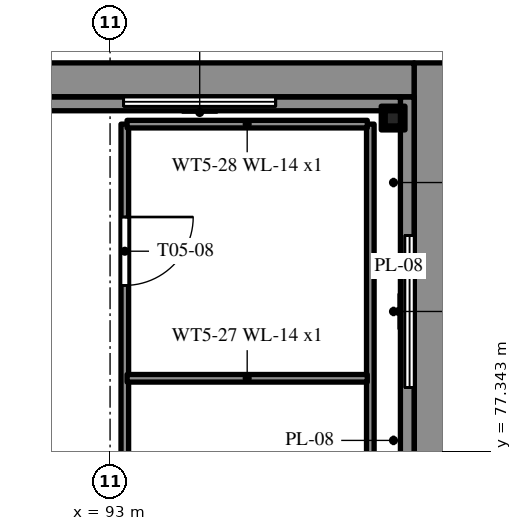
"""IFC4 building model, lengths in metres.
Left out: names, types, materials, properties, quantities, classifications, styles, units other than length and angle.
Written with IfcOpenShell. Run it as: python <this file> out.ifc"""

import sys

from ifc_helpers import new_model, si_unit, direction, frame, frame_2d, origin, origin_2d, place, context, subcontext, project, spatial, polyline, rectangle, hollow_rectangle, i_section, outline, extrude, element, fill, save


model = new_model("IFC4")
c1 = context("Model", 3, precision=1e-05, world=origin(), true_north=direction((0.0, 1.0)))
c2 = subcontext(c1, "Body", "Model", "MODEL_VIEW")
j1 = project(units=[si_unit("LENGTHUNIT", "METRE"), si_unit("PLANEANGLEUNIT", "RADIAN")], contexts=[c1])
p1 = place(None, origin())
s1 = spatial("IfcSite", under=j1, at=p1, CompositionType="ELEMENT")
p2 = place(p1, origin())
s2 = spatial("IfcBuilding", under=s1, at=p2, CompositionType="ELEMENT")
p3 = place(p2, frame((0.0, 0.0, 24.0)))
s3 = spatial("IfcBuildingStorey", under=s2, at=p3, CompositionType="ELEMENT", Elevation=24.0)
p4 = place(p3, frame((97.225, 55.4, 0.0), z_axis=(0.0, 0.0, 1.0), x_axis=(0.0, 1.0, 0.0)))
e1 = element("IfcWall", 1, at=p4, inside=s3, PredefinedType="SOLIDWALL", context=c2, shape_type="SweptSolid", body=[
    extrude(outline(polyline([(0.0, 0.0), (27.05, 0.0), (27.05, 0.5), (25.75, 0.5), (25.664, 0.5), (25.578, 0.5), (22.978, 0.5), (22.899, 0.5), (20.704, 0.5), (20.509, 0.5), (18.742, 0.5), (18.677, 0.5), (17.018, 0.5), (16.956, 0.5), (16.894, 0.5), (13.935, 0.5), (13.871, 0.5), (13.807, 0.5), (11.958, 0.5), (11.896, 0.5), (10.181, 0.5), (10.025, 0.5), (8.455, 0.5), (8.397, 0.5), (6.845, 0.5), (6.789, 0.5), (6.732, 0.5), (3.004, 0.5), (2.947, 0.5), (2.89, 0.5), (1.288, 0.5), (1.232, 0.5), (0.0, 0.5), (0.0, 0.0)])), frame((0.0, 0.225, 0.0), z_axis=(0.0, -1.0, 0.0), x_axis=(1.0, 0.0, 0.0)), (0.0, 0.0, 1.0), 0.45),
])
p5 = place(p3, frame((71.0, 82.225, 0.0), z_axis=(0.0, 0.0, 1.0), x_axis=(1.0, 0.0, 0.0)))
e2 = element("IfcWall", 2, at=p5, inside=s3, PredefinedType="SOLIDWALL", context=c2, shape_type="SweptSolid", body=[
    extrude(outline(polyline([(0.0, 0.0), (26.0, 0.0), (26.0, 0.5), (23.148, 0.5), (22.794, 0.5), (22.44, 0.5), (19.953, 0.5), (19.716, 0.5), (19.631, 0.5), (19.478, 0.5), (19.394, 0.5), (19.157, 0.5), (6.843, 0.5), (6.606, 0.5), (6.522, 0.5), (6.369, 0.5), (6.284, 0.5), (6.047, 0.5), (3.56, 0.5), (3.206, 0.5), (2.852, 0.5), (0.0, 0.5), (0.0, 0.0)])), frame((0.0, 0.225, 0.0), z_axis=(0.0, -1.0, 0.0), x_axis=(1.0, 0.0, 0.0)), (0.0, 0.0, 1.0), 0.45),
])
p6 = place(p3, frame((96.724, 81.724, 0.0), z_axis=(0.0, 0.0, 1.0), x_axis=(1.0, 0.0, 0.0)))
e3 = element("IfcColumn", 3, at=p6, inside=s3, PredefinedType="COLUMN", context=c2, shape_type="SweptSolid", body=[
    extrude(i_section(OverallWidth=0.312, OverallDepth=0.312, WebThickness=0.017, FlangeThickness=0.017, FilletRadius=0.016, at=origin_2d()), origin(), (0.0, 0.0, 1.0), 12.21),
])
p7 = place(p3, frame((96.424, 70.0, 0.0), z_axis=(0.0, 0.0, 1.0), x_axis=(0.0, 1.0, 0.0)))
e4 = element("IfcWall", 4, at=p7, inside=s3, PredefinedType="PARTITIONING", context=c2, shape_type="SweptSolid", body=[
    extrude(rectangle(XDim=11.644, YDim=0.1, at=frame_2d((5.822, 0.0))), origin(), (0.0, 0.0, 1.0), 3.2),
])
p8 = place(p3, frame((93.194, 70.0, 0.0), z_axis=(0.0, 0.0, 1.0), x_axis=(0.0, 1.0, 0.0)))
e5 = element("IfcWall", 5, at=p8, inside=s3, PredefinedType="PARTITIONING", context=c2, shape_type="SweptSolid", body=[
    extrude(rectangle(XDim=11.644, YDim=0.1, at=frame_2d((5.822, 0.0))), origin(), (0.0, 0.0, 1.0), 3.2),
])
p9 = place(p8, frame((1.75, 0.0, 0.0)))
e6 = element("IfcOpeningElement", 6, at=p9, cuts=e5, PredefinedType="OPENING", context=c2, shape_type="SweptSolid", body=[
    extrude(rectangle(XDim=0.9, YDim=2.1, at=frame_2d((0.45, 1.05))), frame((0.0, 0.06, 0.0), z_axis=(0.0, -1.0, 0.0), x_axis=(1.0, 0.0, 0.0)), (0.0, 0.0, 1.0), 0.12),
])
p10 = place(p8, frame((5.9, 0.0, 0.0)))
e7 = element("IfcOpeningElement", 7, at=p10, cuts=e5, PredefinedType="OPENING", context=c2, shape_type="SweptSolid", body=[
    extrude(rectangle(XDim=0.9, YDim=2.1, at=frame_2d((0.45, 1.05))), frame((0.0, 0.06, 0.0), z_axis=(0.0, -1.0, 0.0), x_axis=(1.0, 0.0, 0.0)), (0.0, 0.0, 1.0), 0.12),
])
p11 = place(p8, frame((9.522, 0.0, 0.0)))
e8 = element("IfcOpeningElement", 8, at=p11, cuts=e5, PredefinedType="OPENING", context=c2, shape_type="SweptSolid", body=[
    extrude(rectangle(XDim=0.9, YDim=2.1, at=frame_2d((0.45, 1.05))), frame((0.0, 0.06, 0.0), z_axis=(0.0, -1.0, 0.0), x_axis=(1.0, 0.0, 0.0)), (0.0, 0.0, 1.0), 0.12),
])
for number, where, z_axis, x_axis in (
    (9, (96.384, 78.3, 0.0), (0.0, 0.0, 1.0), (-1.0, 0.0, 0.0)),
    (10, (96.384, 81.644, 0.0), (0.0, 0.0, 1.0), (-1.0, 0.0, 0.0)),
):
    element("IfcWall", number, at=place(p3, frame(where, z_axis=z_axis, x_axis=x_axis)), inside=s3, PredefinedType="PARTITIONING", context=c2, shape_type="SweptSolid", body=[
        extrude(rectangle(XDim=3.16, YDim=0.1, at=frame_2d((1.58, 0.0))), origin(), (0.0, 0.0, 1.0), 3.2),
    ])
p12 = place(p3, frame((96.94, 56.12, 0.0), z_axis=(0.0, 0.0, 1.0), x_axis=(0.0, 1.0, 0.0)))
e11 = element("IfcWall", 11, at=p12, inside=s3, PredefinedType="STANDARD", context=c2, shape_type="SweptSolid", body=[
    extrude(rectangle(XDim=25.76, YDim=0.12, at=frame_2d((12.88, 0.0))), origin(), (0.0, 0.0, 1.0), 4.0),
])
p13 = place(p12, frame((1.701, 0.0, 1.4)))
e12 = element("IfcOpeningElement", 12, at=p13, cuts=e11, PredefinedType="OPENING", context=c2, shape_type="SweptSolid", body=[
    extrude(rectangle(XDim=2.0, YDim=1.2, at=frame_2d((1.0, 0.6))), frame((0.0, 0.07, 0.0), z_axis=(0.0, -1.0, 0.0), x_axis=(1.0, 0.0, 0.0)), (0.0, 0.0, 1.0), 0.14),
])
p14 = place(p12, frame((11.88, 0.0, 1.4)))
e13 = element("IfcOpeningElement", 13, at=p14, cuts=e11, PredefinedType="OPENING", context=c2, shape_type="SweptSolid", body=[
    extrude(rectangle(XDim=2.0, YDim=1.2, at=frame_2d((1.0, 0.6))), frame((0.0, 0.07, 0.0), z_axis=(0.0, -1.0, 0.0), x_axis=(1.0, 0.0, 0.0)), (0.0, 0.0, 1.0), 0.14),
])
p15 = place(p12, frame((22.059, 0.0, 1.4)))
e14 = element("IfcOpeningElement", 14, at=p15, cuts=e11, PredefinedType="OPENING", context=c2, shape_type="SweptSolid", body=[
    extrude(rectangle(XDim=2.0, YDim=1.2, at=frame_2d((1.0, 0.6))), frame((0.0, 0.07, 0.0), z_axis=(0.0, -1.0, 0.0), x_axis=(1.0, 0.0, 0.0)), (0.0, 0.0, 1.0), 0.14),
])
p16 = place(p12, frame((7.49, 0.0, 0.5)))
e15 = element("IfcOpeningElement", 15, at=p16, cuts=e11, PredefinedType="OPENING", context=c2, shape_type="SweptSolid", body=[
    extrude(rectangle(XDim=0.6, YDim=2.1, at=frame_2d((0.3, 1.05))), frame((0.0, 0.07, 0.0), z_axis=(0.0, -1.0, 0.0), x_axis=(1.0, 0.0, 0.0)), (0.0, 0.0, 1.0), 0.14),
])
p17 = place(p12, frame((17.67, 0.0, 0.5)))
e16 = element("IfcOpeningElement", 16, at=p17, cuts=e11, PredefinedType="OPENING", context=c2, shape_type="SweptSolid", body=[
    extrude(rectangle(XDim=0.6, YDim=2.1, at=frame_2d((0.3, 1.05))), frame((0.0, 0.07, 0.0), z_axis=(0.0, -1.0, 0.0), x_axis=(1.0, 0.0, 0.0)), (0.0, 0.0, 1.0), 0.14),
])
p18 = place(p3, frame((96.94, 56.12, 4.0), z_axis=(0.0, 0.0, 1.0), x_axis=(0.0, 1.0, 0.0)))
e17 = element("IfcWall", 17, at=p18, inside=s3, PredefinedType="STANDARD", context=c2, shape_type="SweptSolid", body=[
    extrude(rectangle(XDim=25.76, YDim=0.12, at=frame_2d((12.88, 0.0))), origin(), (0.0, 0.0, 1.0), 8.5),
])
p19 = place(p18, frame((1.701, 0.0, 2.4)))
e18 = element("IfcOpeningElement", 18, at=p19, cuts=e17, PredefinedType="OPENING", context=c2, shape_type="SweptSolid", body=[
    extrude(rectangle(XDim=2.0, YDim=1.2, at=frame_2d((1.0, 0.6))), frame((0.0, 0.07, 0.0), z_axis=(0.0, -1.0, 0.0), x_axis=(1.0, 0.0, 0.0)), (0.0, 0.0, 1.0), 0.14),
])
p20 = place(p18, frame((1.701, 0.0, 5.6)))
e19 = element("IfcOpeningElement", 19, at=p20, cuts=e17, PredefinedType="OPENING", context=c2, shape_type="SweptSolid", body=[
    extrude(rectangle(XDim=2.0, YDim=1.2, at=frame_2d((1.0, 0.6))), frame((0.0, 0.07, 0.0), z_axis=(0.0, -1.0, 0.0), x_axis=(1.0, 0.0, 0.0)), (0.0, 0.0, 1.0), 0.14),
])
p21 = place(p18, frame((11.88, 0.0, 2.4)))
e20 = element("IfcOpeningElement", 20, at=p21, cuts=e17, PredefinedType="OPENING", context=c2, shape_type="SweptSolid", body=[
    extrude(rectangle(XDim=2.0, YDim=1.2, at=frame_2d((1.0, 0.6))), frame((0.0, 0.07, 0.0), z_axis=(0.0, -1.0, 0.0), x_axis=(1.0, 0.0, 0.0)), (0.0, 0.0, 1.0), 0.14),
])
p22 = place(p18, frame((11.88, 0.0, 5.6)))
e21 = element("IfcOpeningElement", 21, at=p22, cuts=e17, PredefinedType="OPENING", context=c2, shape_type="SweptSolid", body=[
    extrude(rectangle(XDim=2.0, YDim=1.2, at=frame_2d((1.0, 0.6))), frame((0.0, 0.07, 0.0), z_axis=(0.0, -1.0, 0.0), x_axis=(1.0, 0.0, 0.0)), (0.0, 0.0, 1.0), 0.14),
])
p23 = place(p18, frame((22.059, 0.0, 2.4)))
e22 = element("IfcOpeningElement", 22, at=p23, cuts=e17, PredefinedType="OPENING", context=c2, shape_type="SweptSolid", body=[
    extrude(rectangle(XDim=2.0, YDim=1.2, at=frame_2d((1.0, 0.6))), frame((0.0, 0.07, 0.0), z_axis=(0.0, -1.0, 0.0), x_axis=(1.0, 0.0, 0.0)), (0.0, 0.0, 1.0), 0.14),
])
p24 = place(p18, frame((22.059, 0.0, 5.6)))
e23 = element("IfcOpeningElement", 23, at=p24, cuts=e17, PredefinedType="OPENING", context=c2, shape_type="SweptSolid", body=[
    extrude(rectangle(XDim=2.0, YDim=1.2, at=frame_2d((1.0, 0.6))), frame((0.0, 0.07, 0.0), z_axis=(0.0, -1.0, 0.0), x_axis=(1.0, 0.0, 0.0)), (0.0, 0.0, 1.0), 0.14),
])
p25 = place(p18, frame((7.49, 0.0, 1.5)))
e24 = element("IfcOpeningElement", 24, at=p25, cuts=e17, PredefinedType="OPENING", context=c2, shape_type="SweptSolid", body=[
    extrude(rectangle(XDim=0.6, YDim=2.1, at=frame_2d((0.3, 1.05))), frame((0.0, 0.07, 0.0), z_axis=(0.0, -1.0, 0.0), x_axis=(1.0, 0.0, 0.0)), (0.0, 0.0, 1.0), 0.14),
])
p26 = place(p18, frame((17.67, 0.0, 1.5)))
e25 = element("IfcOpeningElement", 25, at=p26, cuts=e17, PredefinedType="OPENING", context=c2, shape_type="SweptSolid", body=[
    extrude(rectangle(XDim=0.6, YDim=2.1, at=frame_2d((0.3, 1.05))), frame((0.0, 0.07, 0.0), z_axis=(0.0, -1.0, 0.0), x_axis=(1.0, 0.0, 0.0)), (0.0, 0.0, 1.0), 0.14),
])
p27 = place(p3, frame((71.0, 81.94, 0.0), z_axis=(0.0, 0.0, 1.0), x_axis=(1.0, 0.0, 0.0)))
e26 = element("IfcWall", 26, at=p27, inside=s3, PredefinedType="STANDARD", context=c2, shape_type="SweptSolid", body=[
    extrude(rectangle(XDim=26.0, YDim=0.12, at=frame_2d((13.0, 0.0))), origin(), (0.0, 0.0, 1.0), 4.0),
])
p28 = place(p27, frame((1.821, 0.0, 1.4)))
e27 = element("IfcOpeningElement", 27, at=p28, cuts=e26, PredefinedType="OPENING", context=c2, shape_type="SweptSolid", body=[
    extrude(rectangle(XDim=2.0, YDim=1.2, at=frame_2d((1.0, 0.6))), frame((0.0, 0.07, 0.0), z_axis=(0.0, -1.0, 0.0), x_axis=(1.0, 0.0, 0.0)), (0.0, 0.0, 1.0), 0.14),
])
p29 = place(p27, frame((12.0, 0.0, 1.4)))
e28 = element("IfcOpeningElement", 28, at=p29, cuts=e26, PredefinedType="OPENING", context=c2, shape_type="SweptSolid", body=[
    extrude(rectangle(XDim=2.0, YDim=1.2, at=frame_2d((1.0, 0.6))), frame((0.0, 0.07, 0.0), z_axis=(0.0, -1.0, 0.0), x_axis=(1.0, 0.0, 0.0)), (0.0, 0.0, 1.0), 0.14),
])
p30 = place(p27, frame((22.179, 0.0, 1.4)))
e29 = element("IfcOpeningElement", 29, at=p30, cuts=e26, PredefinedType="OPENING", context=c2, shape_type="SweptSolid", body=[
    extrude(rectangle(XDim=2.0, YDim=1.2, at=frame_2d((1.0, 0.6))), frame((0.0, 0.07, 0.0), z_axis=(0.0, -1.0, 0.0), x_axis=(1.0, 0.0, 0.0)), (0.0, 0.0, 1.0), 0.14),
])
p31 = place(p27, frame((7.61, 0.0, 0.5)))
e30 = element("IfcOpeningElement", 30, at=p31, cuts=e26, PredefinedType="OPENING", context=c2, shape_type="SweptSolid", body=[
    extrude(rectangle(XDim=0.6, YDim=2.1, at=frame_2d((0.3, 1.05))), frame((0.0, 0.07, 0.0), z_axis=(0.0, -1.0, 0.0), x_axis=(1.0, 0.0, 0.0)), (0.0, 0.0, 1.0), 0.14),
])
p32 = place(p27, frame((17.79, 0.0, 0.5)))
e31 = element("IfcOpeningElement", 31, at=p32, cuts=e26, PredefinedType="OPENING", context=c2, shape_type="SweptSolid", body=[
    extrude(rectangle(XDim=0.6, YDim=2.1, at=frame_2d((0.3, 1.05))), frame((0.0, 0.07, 0.0), z_axis=(0.0, -1.0, 0.0), x_axis=(1.0, 0.0, 0.0)), (0.0, 0.0, 1.0), 0.14),
])
p33 = place(p3, frame((71.0, 81.94, 4.0), z_axis=(0.0, 0.0, 1.0), x_axis=(1.0, 0.0, 0.0)))
e32 = element("IfcWall", 32, at=p33, inside=s3, PredefinedType="STANDARD", context=c2, shape_type="SweptSolid", body=[
    extrude(rectangle(XDim=26.0, YDim=0.12, at=frame_2d((13.0, 0.0))), origin(), (0.0, 0.0, 1.0), 8.5),
])
p34 = place(p33, frame((1.821, 0.0, 2.4)))
e33 = element("IfcOpeningElement", 33, at=p34, cuts=e32, PredefinedType="OPENING", context=c2, shape_type="SweptSolid", body=[
    extrude(rectangle(XDim=2.0, YDim=1.2, at=frame_2d((1.0, 0.6))), frame((0.0, 0.07, 0.0), z_axis=(0.0, -1.0, 0.0), x_axis=(1.0, 0.0, 0.0)), (0.0, 0.0, 1.0), 0.14),
])
p35 = place(p33, frame((1.821, 0.0, 5.6)))
e34 = element("IfcOpeningElement", 34, at=p35, cuts=e32, PredefinedType="OPENING", context=c2, shape_type="SweptSolid", body=[
    extrude(rectangle(XDim=2.0, YDim=1.2, at=frame_2d((1.0, 0.6))), frame((0.0, 0.07, 0.0), z_axis=(0.0, -1.0, 0.0), x_axis=(1.0, 0.0, 0.0)), (0.0, 0.0, 1.0), 0.14),
])
p36 = place(p33, frame((12.0, 0.0, 2.4)))
e35 = element("IfcOpeningElement", 35, at=p36, cuts=e32, PredefinedType="OPENING", context=c2, shape_type="SweptSolid", body=[
    extrude(rectangle(XDim=2.0, YDim=1.2, at=frame_2d((1.0, 0.6))), frame((0.0, 0.07, 0.0), z_axis=(0.0, -1.0, 0.0), x_axis=(1.0, 0.0, 0.0)), (0.0, 0.0, 1.0), 0.14),
])
p37 = place(p33, frame((12.0, 0.0, 5.6)))
e36 = element("IfcOpeningElement", 36, at=p37, cuts=e32, PredefinedType="OPENING", context=c2, shape_type="SweptSolid", body=[
    extrude(rectangle(XDim=2.0, YDim=1.2, at=frame_2d((1.0, 0.6))), frame((0.0, 0.07, 0.0), z_axis=(0.0, -1.0, 0.0), x_axis=(1.0, 0.0, 0.0)), (0.0, 0.0, 1.0), 0.14),
])
p38 = place(p33, frame((22.179, 0.0, 2.4)))
e37 = element("IfcOpeningElement", 37, at=p38, cuts=e32, PredefinedType="OPENING", context=c2, shape_type="SweptSolid", body=[
    extrude(rectangle(XDim=2.0, YDim=1.2, at=frame_2d((1.0, 0.6))), frame((0.0, 0.07, 0.0), z_axis=(0.0, -1.0, 0.0), x_axis=(1.0, 0.0, 0.0)), (0.0, 0.0, 1.0), 0.14),
])
p39 = place(p33, frame((22.179, 0.0, 5.6)))
e38 = element("IfcOpeningElement", 38, at=p39, cuts=e32, PredefinedType="OPENING", context=c2, shape_type="SweptSolid", body=[
    extrude(rectangle(XDim=2.0, YDim=1.2, at=frame_2d((1.0, 0.6))), frame((0.0, 0.07, 0.0), z_axis=(0.0, -1.0, 0.0), x_axis=(1.0, 0.0, 0.0)), (0.0, 0.0, 1.0), 0.14),
])
p40 = place(p33, frame((7.61, 0.0, 1.5)))
e39 = element("IfcOpeningElement", 39, at=p40, cuts=e32, PredefinedType="OPENING", context=c2, shape_type="SweptSolid", body=[
    extrude(rectangle(XDim=0.6, YDim=2.1, at=frame_2d((0.3, 1.05))), frame((0.0, 0.07, 0.0), z_axis=(0.0, -1.0, 0.0), x_axis=(1.0, 0.0, 0.0)), (0.0, 0.0, 1.0), 0.14),
])
p41 = place(p33, frame((17.79, 0.0, 1.5)))
e40 = element("IfcOpeningElement", 40, at=p41, cuts=e32, PredefinedType="OPENING", context=c2, shape_type="SweptSolid", body=[
    extrude(rectangle(XDim=0.6, YDim=2.1, at=frame_2d((0.3, 1.05))), frame((0.0, 0.07, 0.0), z_axis=(0.0, -1.0, 0.0), x_axis=(1.0, 0.0, 0.0)), (0.0, 0.0, 1.0), 0.14),
])
p42 = place(p3, frame((96.91, 56.0, 12.5), z_axis=(0.0, 0.0, 1.0), x_axis=(0.0, 1.0, 0.0)))
e41 = element("IfcWall", 41, at=p42, inside=s3, PredefinedType="PARAPET", context=c2, shape_type="SweptSolid", body=[
    extrude(rectangle(XDim=26.0, YDim=0.18, at=frame_2d((13.0, 0.0))), origin(), (0.0, 0.0, 1.0), 1.1),
])
p43 = place(p3, frame((71.18, 81.91, 12.5), z_axis=(0.0, 0.0, 1.0), x_axis=(1.0, 0.0, 0.0)))
e42 = element("IfcWall", 42, at=p43, inside=s3, PredefinedType="PARAPET", context=c2, shape_type="SweptSolid", body=[
    extrude(rectangle(XDim=25.64, YDim=0.18, at=frame_2d((12.82, 0.0))), origin(), (0.0, 0.0, 1.0), 1.1),
])
p44 = place(p3, frame((96.72, 81.72, 12.21), z_axis=(0.0, 0.0, 1.0), x_axis=(1.0, 0.0, 0.0)))
e43 = element("IfcColumn", 43, at=p44, inside=s3, PredefinedType="COLUMN", context=c2, shape_type="SweptSolid", body=[
    extrude(hollow_rectangle(XDim=0.2, YDim=0.2, WallThickness=0.01, InnerFilletRadius=0.01, OuterFilletRadius=0.02, at=origin_2d()), origin(), (0.0, 0.0, 1.0), 1.39),
])
p45 = place(p11, frame((0.9, 0.0, 0.0), z_axis=(0.0, 0.0, 1.0), x_axis=(-1.0, 0.0, 0.0)))
e44 = element("IfcDoor", 44, at=p45, inside=s3, OperationType="SINGLE_SWING_LEFT", PredefinedType="DOOR", context=c2, shape_type="SweptSolid", body=[
    extrude(rectangle(XDim=0.9, YDim=2.1, at=frame_2d((0.45, 1.05))), frame((0.0, 0.025, 0.0), z_axis=(0.0, -1.0, 0.0), x_axis=(1.0, 0.0, 0.0)), (0.0, 0.0, 1.0), 0.05),
])
fill(e8, e44)
p46 = place(p15, origin())
e45 = element("IfcWindow", 45, at=p46, inside=s3, PartitioningType="SINGLE_PANEL", PredefinedType="WINDOW", context=c2, shape_type="SweptSolid", body=[
    extrude(rectangle(XDim=2.0, YDim=1.2, at=frame_2d((1.0, 0.6))), frame((0.0, 0.03, 0.0), z_axis=(0.0, -1.0, 0.0), x_axis=(1.0, 0.0, 0.0)), (0.0, 0.0, 1.0), 0.06),
])
fill(e14, e45)
p47 = place(p23, origin())
e46 = element("IfcWindow", 46, at=p47, inside=s3, PartitioningType="SINGLE_PANEL", PredefinedType="WINDOW", context=c2, shape_type="SweptSolid", body=[
    extrude(rectangle(XDim=2.0, YDim=1.2, at=frame_2d((1.0, 0.6))), frame((0.0, 0.03, 0.0), z_axis=(0.0, -1.0, 0.0), x_axis=(1.0, 0.0, 0.0)), (0.0, 0.0, 1.0), 0.06),
])
fill(e22, e46)
p48 = place(p24, origin())
e47 = element("IfcWindow", 47, at=p48, inside=s3, PartitioningType="SINGLE_PANEL", PredefinedType="WINDOW", context=c2, shape_type="SweptSolid", body=[
    extrude(rectangle(XDim=2.0, YDim=1.2, at=frame_2d((1.0, 0.6))), frame((0.0, 0.03, 0.0), z_axis=(0.0, -1.0, 0.0), x_axis=(1.0, 0.0, 0.0)), (0.0, 0.0, 1.0), 0.06),
])
fill(e23, e47)
p49 = place(p30, origin())
e48 = element("IfcWindow", 48, at=p49, inside=s3, PartitioningType="SINGLE_PANEL", PredefinedType="WINDOW", context=c2, shape_type="SweptSolid", body=[
    extrude(rectangle(XDim=2.0, YDim=1.2, at=frame_2d((1.0, 0.6))), frame((0.0, 0.03, 0.0), z_axis=(0.0, -1.0, 0.0), x_axis=(1.0, 0.0, 0.0)), (0.0, 0.0, 1.0), 0.06),
])
fill(e29, e48)
p50 = place(p38, origin())
e49 = element("IfcWindow", 49, at=p50, inside=s3, PartitioningType="SINGLE_PANEL", PredefinedType="WINDOW", context=c2, shape_type="SweptSolid", body=[
    extrude(rectangle(XDim=2.0, YDim=1.2, at=frame_2d((1.0, 0.6))), frame((0.0, 0.03, 0.0), z_axis=(0.0, -1.0, 0.0), x_axis=(1.0, 0.0, 0.0)), (0.0, 0.0, 1.0), 0.06),
])
fill(e37, e49)
p51 = place(p39, origin())
e50 = element("IfcWindow", 50, at=p51, inside=s3, PartitioningType="SINGLE_PANEL", PredefinedType="WINDOW", context=c2, shape_type="SweptSolid", body=[
    extrude(rectangle(XDim=2.0, YDim=1.2, at=frame_2d((1.0, 0.6))), frame((0.0, 0.03, 0.0), z_axis=(0.0, -1.0, 0.0), x_axis=(1.0, 0.0, 0.0)), (0.0, 0.0, 1.0), 0.06),
])
fill(e38, e50)
save(model, sys.argv[1])
